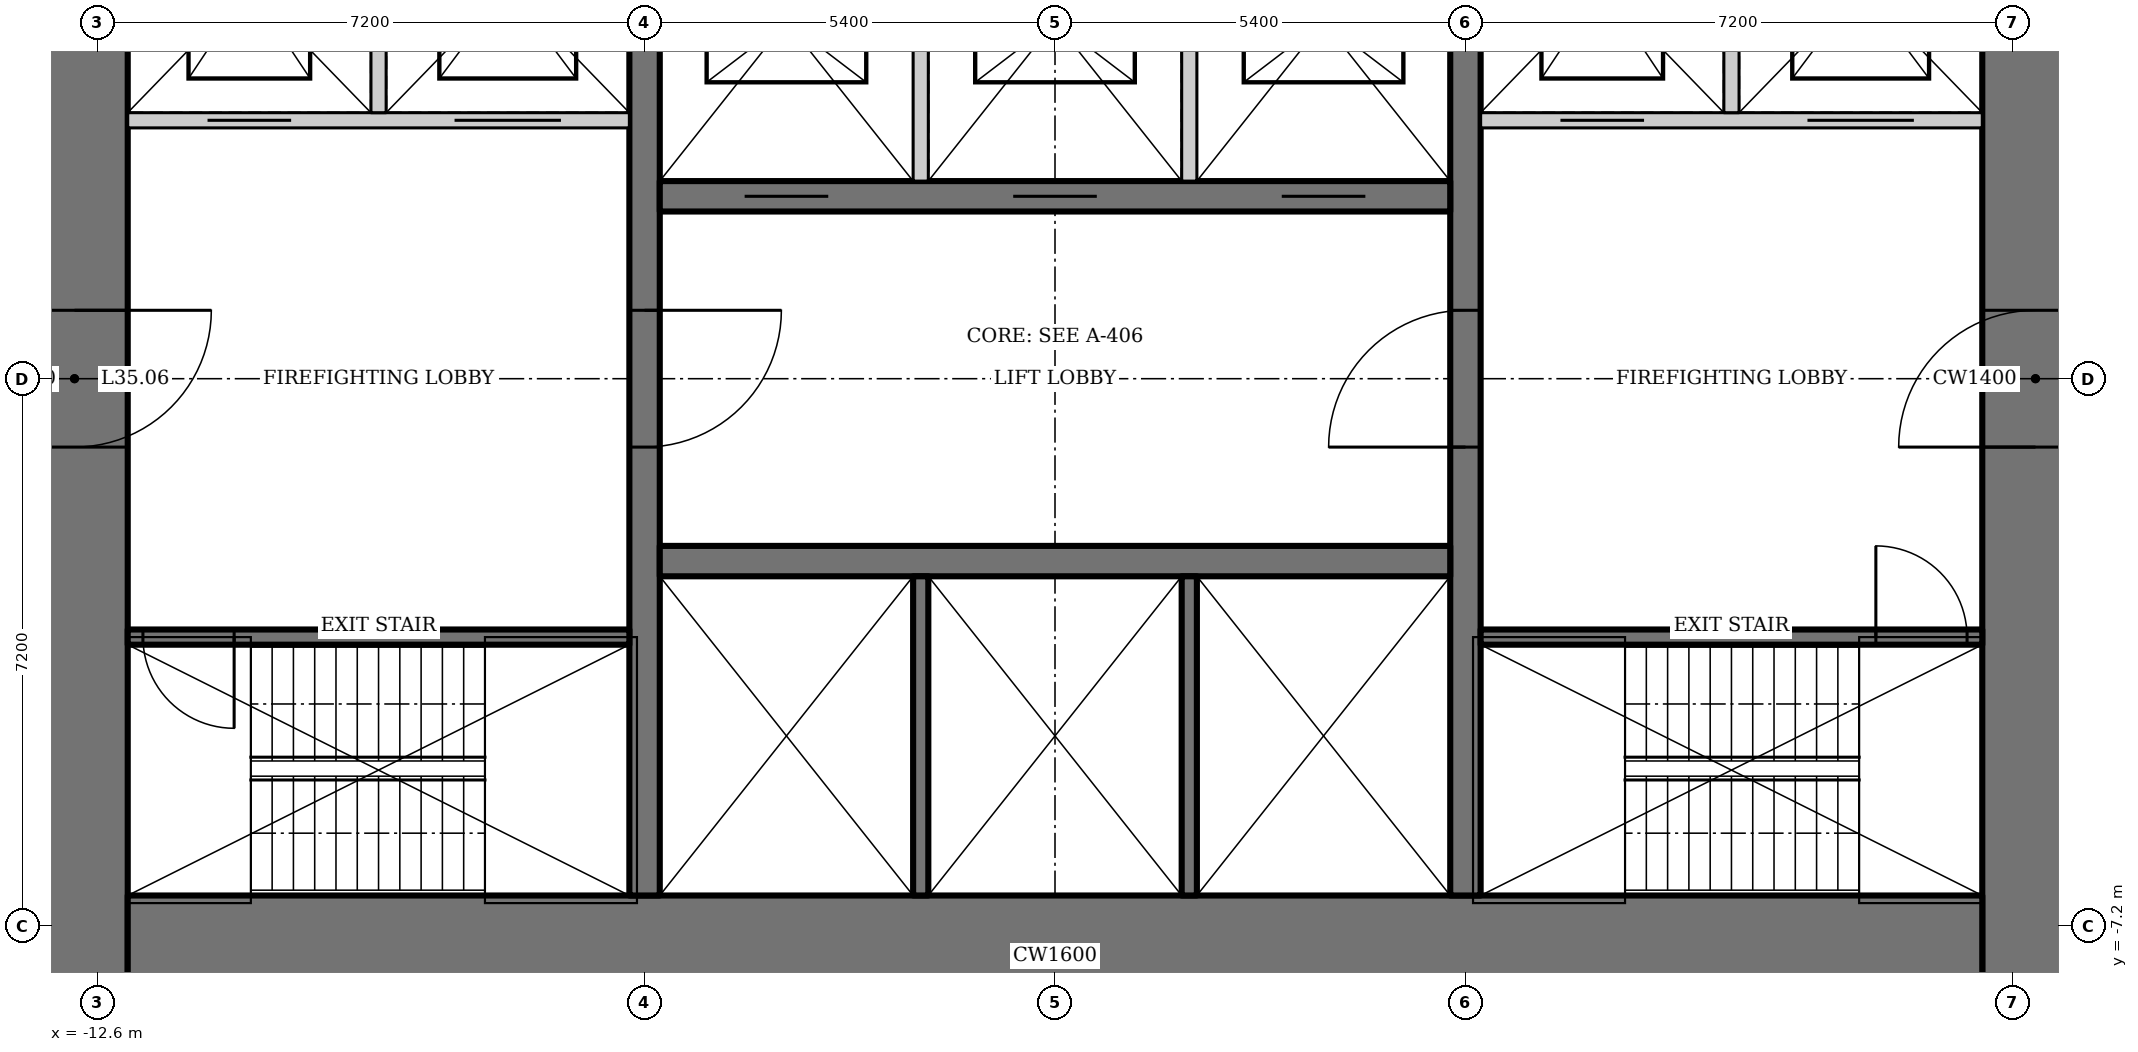
"""IFC4 building model, lengths in metres.
Left out: names, types, materials, properties, quantities, classifications, styles, units other than length and angle.
Written with IfcOpenShell. Run it as: python <this file> out.ifc"""

import sys

from ifc_helpers import new_model, si_unit, direction, frame, frame_2d, origin, place, context, subcontext, project, spatial, rectangle, extrude, element, fill, save


model = new_model("IFC4")
c1 = context("Model", 3, precision=1e-05, world=origin(), true_north=direction((0.0, 1.0)))
c2 = subcontext(c1, "Body", "Model", "MODEL_VIEW")
j1 = project(units=[si_unit("LENGTHUNIT", "METRE"), si_unit("PLANEANGLEUNIT", "RADIAN")], contexts=[c1])
p1 = place(None, origin())
s1 = spatial("IfcSite", under=j1, at=p1, CompositionType="ELEMENT")
p2 = place(p1, origin())
s2 = spatial("IfcBuilding", under=s1, at=p2, CompositionType="ELEMENT")
p3 = place(p2, frame((0.0, 0.0, 151.0)))
s3 = spatial("IfcBuildingStorey", under=s2, at=p3, CompositionType="ELEMENT", Elevation=151.0)
p4 = place(p3, frame((12.9, -13.0, 0.0), z_axis=(0.0, 0.0, 1.0), x_axis=(0.0, 1.0, 0.0)))
e1 = element("IfcWall", 1, at=p4, inside=s3, PredefinedType="SHEAR", context=c2, shape_type="SweptSolid", body=[
    extrude(rectangle(XDim=26.0, YDim=1.4, at=frame_2d((13.0, 0.0))), origin(), (0.0, 0.0, 1.0), 4.2),
])
p5 = place(p4, frame((12.1, 0.0, 0.0)))
e2 = element("IfcOpeningElement", 2, at=p5, cuts=e1, PredefinedType="OPENING", context=c2, shape_type="SweptSolid", body=[
    extrude(rectangle(XDim=1.8, YDim=2.1, at=frame_2d((0.9, 1.05))), frame((0.0, 0.71, 0.0), z_axis=(0.0, -1.0, 0.0), x_axis=(1.0, 0.0, 0.0)), (0.0, 0.0, 1.0), 1.42),
])
p6 = place(p3, frame((-12.9, 13.0, 0.0), z_axis=(0.0, 0.0, 1.0), x_axis=(0.0, -1.0, 0.0)))
e3 = element("IfcWall", 3, at=p6, inside=s3, PredefinedType="SHEAR", context=c2, shape_type="SweptSolid", body=[
    extrude(rectangle(XDim=26.0, YDim=1.4, at=frame_2d((13.0, 0.0))), origin(), (0.0, 0.0, 1.0), 4.2),
])
p7 = place(p6, frame((12.1, 0.0, 0.0)))
e4 = element("IfcOpeningElement", 4, at=p7, cuts=e3, PredefinedType="OPENING", context=c2, shape_type="SweptSolid", body=[
    extrude(rectangle(XDim=1.8, YDim=2.1, at=frame_2d((0.9, 1.05))), frame((0.0, 0.71, 0.0), z_axis=(0.0, -1.0, 0.0), x_axis=(1.0, 0.0, 0.0)), (0.0, 0.0, 1.0), 1.42),
])
p8 = place(p3, frame((-12.2, -7.6, 0.0), z_axis=(0.0, 0.0, 1.0), x_axis=(1.0, 0.0, 0.0)))
e5 = element("IfcWall", 5, at=p8, inside=s3, PredefinedType="SHEAR", context=c2, shape_type="SweptSolid", body=[
    extrude(rectangle(XDim=24.4, YDim=1.6, at=frame_2d((12.2, 0.0))), origin(), (0.0, 0.0, 1.0), 4.2),
])
p9 = place(p3, frame((5.4, -6.8, 0.0), z_axis=(0.0, 0.0, 1.0), x_axis=(0.0, 1.0, 0.0)))
e6 = element("IfcWall", 6, at=p9, inside=s3, PredefinedType="SHEAR", context=c2, shape_type="SweptSolid", body=[
    extrude(rectangle(XDim=13.6, YDim=0.4, at=frame_2d((6.8, 0.0))), origin(), (0.0, 0.0, 1.0), 4.2),
])
p10 = place(p9, frame((5.9, 0.0, 0.0)))
e7 = element("IfcOpeningElement", 7, at=p10, cuts=e6, PredefinedType="OPENING", context=c2, shape_type="SweptSolid", body=[
    extrude(rectangle(XDim=1.8, YDim=2.1, at=frame_2d((0.9, 1.05))), frame((0.0, 0.21, 0.0), z_axis=(0.0, -1.0, 0.0), x_axis=(1.0, 0.0, 0.0)), (0.0, 0.0, 1.0), 0.42),
])
p11 = place(p3, frame((-5.4, 6.8, 0.0), z_axis=(0.0, 0.0, 1.0), x_axis=(0.0, -1.0, 0.0)))
e8 = element("IfcWall", 8, at=p11, inside=s3, PredefinedType="SHEAR", context=c2, shape_type="SweptSolid", body=[
    extrude(rectangle(XDim=13.6, YDim=0.4, at=frame_2d((6.8, 0.0))), origin(), (0.0, 0.0, 1.0), 4.2),
])
p12 = place(p11, frame((5.9, 0.0, 0.0)))
e9 = element("IfcOpeningElement", 9, at=p12, cuts=e8, PredefinedType="OPENING", context=c2, shape_type="SweptSolid", body=[
    extrude(rectangle(XDim=1.8, YDim=2.1, at=frame_2d((0.9, 1.05))), frame((0.0, 0.21, 0.0), z_axis=(0.0, -1.0, 0.0), x_axis=(1.0, 0.0, 0.0)), (0.0, 0.0, 1.0), 0.42),
])
p13 = place(p3, frame((-5.2, -2.4, 0.0), z_axis=(0.0, 0.0, 1.0), x_axis=(1.0, 0.0, 0.0)))
e10 = element("IfcWall", 10, at=p13, inside=s3, PredefinedType="SHEAR", context=c2, shape_type="SweptSolid", body=[
    extrude(rectangle(XDim=10.4, YDim=0.4, at=frame_2d((5.2, 0.0))), origin(), (0.0, 0.0, 1.0), 4.2),
])
for number, where, z_axis, x_axis in (
    (11, (-1.767, -2.6, 0.0), (0.0, 0.0, 1.0), (0.0, -1.0, 0.0)),
    (12, (1.767, -2.6, 0.0), (0.0, 0.0, 1.0), (0.0, -1.0, 0.0)),
):
    element("IfcWall", number, at=place(p3, frame(where, z_axis=z_axis, x_axis=x_axis)), inside=s3, PredefinedType="SOLIDWALL", context=c2, shape_type="SweptSolid", body=[
        extrude(rectangle(XDim=4.2, YDim=0.2, at=frame_2d((2.1, 0.0))), origin(), (0.0, 0.0, 1.0), 4.2),
    ])
p14 = place(p3, frame((5.2, 2.4, 0.0), z_axis=(0.0, 0.0, 1.0), x_axis=(-1.0, 0.0, 0.0)))
e13 = element("IfcWall", 13, at=p14, inside=s3, PredefinedType="SHEAR", context=c2, shape_type="SweptSolid", body=[
    extrude(rectangle(XDim=10.4, YDim=0.4, at=frame_2d((5.2, 0.0))), origin(), (0.0, 0.0, 1.0), 4.2),
])
p15 = place(p14, frame((8.183, 0.0, 0.0)))
e14 = element("IfcOpeningElement", 14, at=p15, cuts=e13, PredefinedType="OPENING", context=c2, shape_type="SweptSolid", body=[
    extrude(rectangle(XDim=1.1, YDim=2.2, at=frame_2d((0.55, 1.1))), frame((0.0, 0.21, 0.0), z_axis=(0.0, -1.0, 0.0), x_axis=(1.0, 0.0, 0.0)), (0.0, 0.0, 1.0), 0.42),
])
p16 = place(p14, frame((4.65, 0.0, 0.0)))
e15 = element("IfcOpeningElement", 15, at=p16, cuts=e13, PredefinedType="OPENING", context=c2, shape_type="SweptSolid", body=[
    extrude(rectangle(XDim=1.1, YDim=2.2, at=frame_2d((0.55, 1.1))), frame((0.0, 0.21, 0.0), z_axis=(0.0, -1.0, 0.0), x_axis=(1.0, 0.0, 0.0)), (0.0, 0.0, 1.0), 0.42),
])
p17 = place(p14, frame((1.117, 0.0, 0.0)))
e16 = element("IfcOpeningElement", 16, at=p17, cuts=e13, PredefinedType="OPENING", context=c2, shape_type="SweptSolid", body=[
    extrude(rectangle(XDim=1.1, YDim=2.2, at=frame_2d((0.55, 1.1))), frame((0.0, 0.21, 0.0), z_axis=(0.0, -1.0, 0.0), x_axis=(1.0, 0.0, 0.0)), (0.0, 0.0, 1.0), 0.42),
])
for number, where, z_axis, x_axis in (
    (17, (-1.767, 2.6, 0.0), (0.0, 0.0, 1.0), (0.0, 1.0, 0.0)),
    (18, (1.767, 2.6, 0.0), (0.0, 0.0, 1.0), (0.0, 1.0, 0.0)),
):
    element("IfcWall", number, at=place(p3, frame(where, z_axis=z_axis, x_axis=x_axis)), inside=s3, PredefinedType="SOLIDWALL", context=c2, shape_type="SweptSolid", body=[
        extrude(rectangle(XDim=4.2, YDim=0.2, at=frame_2d((2.1, 0.0))), origin(), (0.0, 0.0, 1.0), 4.2),
    ])
p18 = place(p3, frame((5.6, -3.4, 0.0), z_axis=(0.0, 0.0, 1.0), x_axis=(1.0, 0.0, 0.0)))
e19 = element("IfcWall", 19, at=p18, inside=s3, PredefinedType="SHEAR", context=c2, shape_type="SweptSolid", body=[
    extrude(rectangle(XDim=6.6, YDim=0.2, at=frame_2d((3.3, 0.0))), origin(), (0.0, 0.0, 1.0), 4.2),
])
p19 = place(p18, frame((5.2, 0.0, 0.0)))
e20 = element("IfcOpeningElement", 20, at=p19, cuts=e19, PredefinedType="OPENING", context=c2, shape_type="SweptSolid", body=[
    extrude(rectangle(XDim=1.2, YDim=2.1, at=frame_2d((0.6, 1.05))), frame((0.0, 0.11, 0.0), z_axis=(0.0, -1.0, 0.0), x_axis=(1.0, 0.0, 0.0)), (0.0, 0.0, 1.0), 0.22),
])
p20 = place(p3, frame((12.2, 3.4, 0.0), z_axis=(0.0, 0.0, 1.0), x_axis=(-1.0, 0.0, 0.0)))
e21 = element("IfcWall", 21, at=p20, inside=s3, PredefinedType="SOLIDWALL", context=c2, shape_type="SweptSolid", body=[
    extrude(rectangle(XDim=6.6, YDim=0.2, at=frame_2d((3.3, 0.0))), origin(), (0.0, 0.0, 1.0), 4.2),
])
p21 = place(p20, frame((4.45, 0.0, 0.0)))
e22 = element("IfcOpeningElement", 22, at=p21, cuts=e21, PredefinedType="OPENING", context=c2, shape_type="SweptSolid", body=[
    extrude(rectangle(XDim=1.1, YDim=2.2, at=frame_2d((0.55, 1.1))), frame((0.0, 0.11, 0.0), z_axis=(0.0, -1.0, 0.0), x_axis=(1.0, 0.0, 0.0)), (0.0, 0.0, 1.0), 0.22),
])
p22 = place(p20, frame((0.9, 0.0, 0.0)))
e23 = element("IfcOpeningElement", 23, at=p22, cuts=e21, PredefinedType="OPENING", context=c2, shape_type="SweptSolid", body=[
    extrude(rectangle(XDim=1.4, YDim=2.2, at=frame_2d((0.7, 1.1))), frame((0.0, 0.11, 0.0), z_axis=(0.0, -1.0, 0.0), x_axis=(1.0, 0.0, 0.0)), (0.0, 0.0, 1.0), 0.22),
])
p23 = place(p3, frame((8.9, 3.5, 0.0), z_axis=(0.0, 0.0, 1.0), x_axis=(0.0, 1.0, 0.0)))
e24 = element("IfcWall", 24, at=p23, inside=s3, PredefinedType="SOLIDWALL", context=c2, shape_type="SweptSolid", body=[
    extrude(rectangle(XDim=3.3, YDim=0.2, at=frame_2d((1.65, 0.0))), origin(), (0.0, 0.0, 1.0), 4.2),
])
p24 = place(p3, frame((-5.6, -3.4, 0.0), z_axis=(0.0, 0.0, 1.0), x_axis=(-1.0, 0.0, 0.0)))
e25 = element("IfcWall", 25, at=p24, inside=s3, PredefinedType="SHEAR", context=c2, shape_type="SweptSolid", body=[
    extrude(rectangle(XDim=6.6, YDim=0.2, at=frame_2d((3.3, 0.0))), origin(), (0.0, 0.0, 1.0), 4.2),
])
p25 = place(p24, frame((5.2, 0.0, 0.0)))
e26 = element("IfcOpeningElement", 26, at=p25, cuts=e25, PredefinedType="OPENING", context=c2, shape_type="SweptSolid", body=[
    extrude(rectangle(XDim=1.2, YDim=2.1, at=frame_2d((0.6, 1.05))), frame((0.0, 0.11, 0.0), z_axis=(0.0, -1.0, 0.0), x_axis=(1.0, 0.0, 0.0)), (0.0, 0.0, 1.0), 0.22),
])
p26 = place(p3, frame((-12.2, 3.4, 0.0), z_axis=(0.0, 0.0, 1.0), x_axis=(1.0, 0.0, 0.0)))
e27 = element("IfcWall", 27, at=p26, inside=s3, PredefinedType="SOLIDWALL", context=c2, shape_type="SweptSolid", body=[
    extrude(rectangle(XDim=6.6, YDim=0.2, at=frame_2d((3.3, 0.0))), origin(), (0.0, 0.0, 1.0), 4.2),
])
p27 = place(p26, frame((1.05, 0.0, 0.0)))
e28 = element("IfcOpeningElement", 28, at=p27, cuts=e27, PredefinedType="OPENING", context=c2, shape_type="SweptSolid", body=[
    extrude(rectangle(XDim=1.1, YDim=2.2, at=frame_2d((0.55, 1.1))), frame((0.0, 0.11, 0.0), z_axis=(0.0, -1.0, 0.0), x_axis=(1.0, 0.0, 0.0)), (0.0, 0.0, 1.0), 0.22),
])
p28 = place(p26, frame((4.3, 0.0, 0.0)))
e29 = element("IfcOpeningElement", 29, at=p28, cuts=e27, PredefinedType="OPENING", context=c2, shape_type="SweptSolid", body=[
    extrude(rectangle(XDim=1.4, YDim=2.2, at=frame_2d((0.7, 1.1))), frame((0.0, 0.11, 0.0), z_axis=(0.0, -1.0, 0.0), x_axis=(1.0, 0.0, 0.0)), (0.0, 0.0, 1.0), 0.22),
])
p29 = place(p3, frame((-8.9, 3.5, 0.0), z_axis=(0.0, 0.0, 1.0), x_axis=(0.0, 1.0, 0.0)))
e30 = element("IfcWall", 30, at=p29, inside=s3, PredefinedType="SOLIDWALL", context=c2, shape_type="SweptSolid", body=[
    extrude(rectangle(XDim=3.3, YDim=0.2, at=frame_2d((1.65, 0.0))), origin(), (0.0, 0.0, 1.0), 4.2),
])
p30 = place(p10, origin())
e31 = element("IfcDoor", 31, at=p30, inside=s3, OperationType="DOUBLE_DOOR_DOUBLE_SWING", PredefinedType="DOOR", context=c2, shape_type="SweptSolid", body=[
    extrude(rectangle(XDim=1.8, YDim=2.1, at=frame_2d((0.9, 1.05))), frame((0.0, 0.025, 0.0), z_axis=(0.0, -1.0, 0.0), x_axis=(1.0, 0.0, 0.0)), (0.0, 0.0, 1.0), 0.05),
])
fill(e7, e31)
p31 = place(p12, origin())
e32 = element("IfcDoor", 32, at=p31, inside=s3, OperationType="DOUBLE_DOOR_DOUBLE_SWING", PredefinedType="DOOR", context=c2, shape_type="SweptSolid", body=[
    extrude(rectangle(XDim=1.8, YDim=2.1, at=frame_2d((0.9, 1.05))), frame((0.0, 0.025, 0.0), z_axis=(0.0, -1.0, 0.0), x_axis=(1.0, 0.0, 0.0)), (0.0, 0.0, 1.0), 0.05),
])
fill(e9, e32)
p32 = place(p19, origin())
e33 = element("IfcDoor", 33, at=p32, inside=s3, OperationType="SINGLE_SWING_RIGHT", PredefinedType="DOOR", context=c2, shape_type="SweptSolid", body=[
    extrude(rectangle(XDim=1.2, YDim=2.1, at=frame_2d((0.6, 1.05))), frame((0.0, 0.025, 0.0), z_axis=(0.0, -1.0, 0.0), x_axis=(1.0, 0.0, 0.0)), (0.0, 0.0, 1.0), 0.05),
])
fill(e20, e33)
p33 = place(p25, origin())
e34 = element("IfcDoor", 34, at=p33, inside=s3, OperationType="SINGLE_SWING_RIGHT", PredefinedType="DOOR", context=c2, shape_type="SweptSolid", body=[
    extrude(rectangle(XDim=1.2, YDim=2.1, at=frame_2d((0.6, 1.05))), frame((0.0, 0.025, 0.0), z_axis=(0.0, -1.0, 0.0), x_axis=(1.0, 0.0, 0.0)), (0.0, 0.0, 1.0), 0.05),
])
fill(e26, e34)
p34 = place(p5, origin())
e35 = element("IfcDoor", 35, at=p34, inside=s3, OperationType="DOUBLE_DOOR_DOUBLE_SWING", PredefinedType="DOOR", context=c2, shape_type="SweptSolid", body=[
    extrude(rectangle(XDim=1.8, YDim=2.1, at=frame_2d((0.9, 1.05))), frame((0.0, 0.025, 0.0), z_axis=(0.0, -1.0, 0.0), x_axis=(1.0, 0.0, 0.0)), (0.0, 0.0, 1.0), 0.05),
])
fill(e2, e35)
p35 = place(p7, origin())
e36 = element("IfcDoor", 36, at=p35, inside=s3, OperationType="DOUBLE_DOOR_DOUBLE_SWING", PredefinedType="DOOR", context=c2, shape_type="SweptSolid", body=[
    extrude(rectangle(XDim=1.8, YDim=2.1, at=frame_2d((0.9, 1.05))), frame((0.0, 0.025, 0.0), z_axis=(0.0, -1.0, 0.0), x_axis=(1.0, 0.0, 0.0)), (0.0, 0.0, 1.0), 0.05),
])
fill(e4, e36)
p36 = place(p15, origin())
e37 = element("IfcDoor", 37, at=p36, inside=s3, OperationType="DOUBLE_DOOR_SLIDING", PredefinedType="DOOR", context=c2, shape_type="SweptSolid", body=[
    extrude(rectangle(XDim=1.1, YDim=2.2, at=frame_2d((0.55, 1.1))), frame((0.0, 0.025, 0.0), z_axis=(0.0, -1.0, 0.0), x_axis=(1.0, 0.0, 0.0)), (0.0, 0.0, 1.0), 0.05),
])
fill(e14, e37)
p37 = place(p16, origin())
e38 = element("IfcDoor", 38, at=p37, inside=s3, OperationType="DOUBLE_DOOR_SLIDING", PredefinedType="DOOR", context=c2, shape_type="SweptSolid", body=[
    extrude(rectangle(XDim=1.1, YDim=2.2, at=frame_2d((0.55, 1.1))), frame((0.0, 0.025, 0.0), z_axis=(0.0, -1.0, 0.0), x_axis=(1.0, 0.0, 0.0)), (0.0, 0.0, 1.0), 0.05),
])
fill(e15, e38)
p38 = place(p17, origin())
e39 = element("IfcDoor", 39, at=p38, inside=s3, OperationType="DOUBLE_DOOR_SLIDING", PredefinedType="DOOR", context=c2, shape_type="SweptSolid", body=[
    extrude(rectangle(XDim=1.1, YDim=2.2, at=frame_2d((0.55, 1.1))), frame((0.0, 0.025, 0.0), z_axis=(0.0, -1.0, 0.0), x_axis=(1.0, 0.0, 0.0)), (0.0, 0.0, 1.0), 0.05),
])
fill(e16, e39)
p39 = place(p27, origin())
e40 = element("IfcDoor", 40, at=p39, inside=s3, OperationType="DOUBLE_DOOR_SLIDING", PredefinedType="DOOR", context=c2, shape_type="SweptSolid", body=[
    extrude(rectangle(XDim=1.1, YDim=2.2, at=frame_2d((0.55, 1.1))), frame((0.0, 0.025, 0.0), z_axis=(0.0, -1.0, 0.0), x_axis=(1.0, 0.0, 0.0)), (0.0, 0.0, 1.0), 0.05),
])
fill(e28, e40)
p40 = place(p28, origin())
e41 = element("IfcDoor", 41, at=p40, inside=s3, OperationType="DOUBLE_DOOR_SLIDING", PredefinedType="DOOR", context=c2, shape_type="SweptSolid", body=[
    extrude(rectangle(XDim=1.4, YDim=2.2, at=frame_2d((0.7, 1.1))), frame((0.0, 0.025, 0.0), z_axis=(0.0, -1.0, 0.0), x_axis=(1.0, 0.0, 0.0)), (0.0, 0.0, 1.0), 0.05),
])
fill(e29, e41)
p41 = place(p21, origin())
e42 = element("IfcDoor", 42, at=p41, inside=s3, OperationType="DOUBLE_DOOR_SLIDING", PredefinedType="DOOR", context=c2, shape_type="SweptSolid", body=[
    extrude(rectangle(XDim=1.1, YDim=2.2, at=frame_2d((0.55, 1.1))), frame((0.0, 0.025, 0.0), z_axis=(0.0, -1.0, 0.0), x_axis=(1.0, 0.0, 0.0)), (0.0, 0.0, 1.0), 0.05),
])
fill(e22, e42)
p42 = place(p22, origin())
e43 = element("IfcDoor", 43, at=p42, inside=s3, OperationType="DOUBLE_DOOR_SLIDING", PredefinedType="DOOR", context=c2, shape_type="SweptSolid", body=[
    extrude(rectangle(XDim=1.4, YDim=2.2, at=frame_2d((0.7, 1.1))), frame((0.0, 0.025, 0.0), z_axis=(0.0, -1.0, 0.0), x_axis=(1.0, 0.0, 0.0)), (0.0, 0.0, 1.0), 0.05),
])
fill(e23, e43)
save(model, sys.argv[1])
